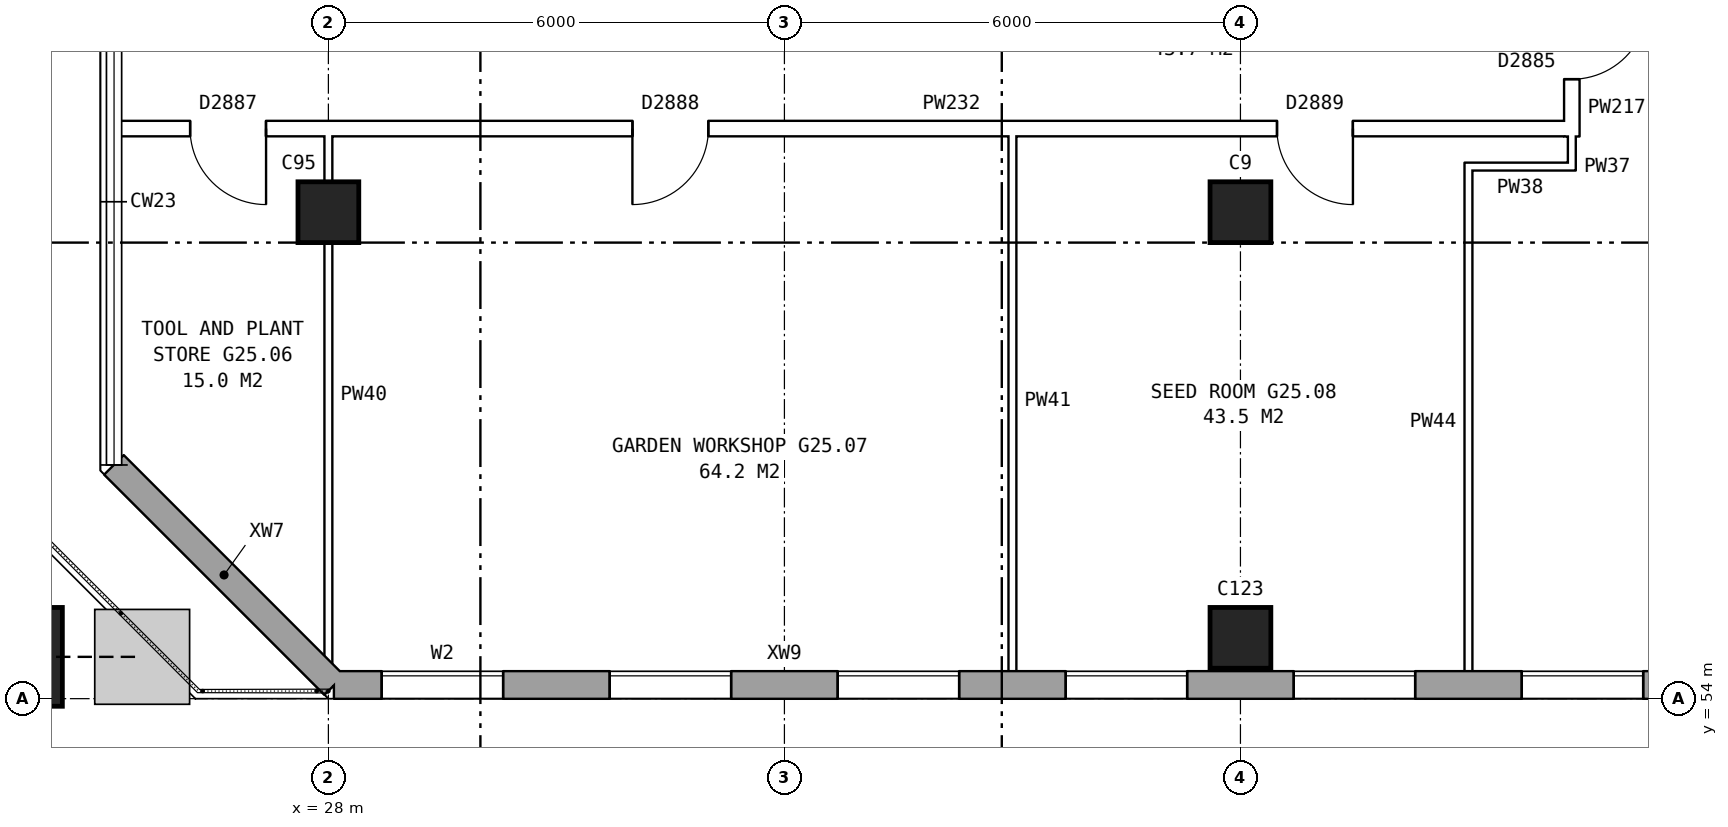
"""IFC4 building model, lengths in metres.
Left out: names, types, materials, properties, quantities, classifications, styles, units other than length and angle.
Written with IfcOpenShell. Run it as: python <this file> out.ifc"""

import sys

from ifc_helpers import new_model, si_unit, direction, frame, frame_2d, origin, origin_2d, place, context, subcontext, project, spatial, rectangle, hollow_rectangle, extrude, element, fill, save


model = new_model("IFC4")
c1 = context("Model", 3, precision=1e-05, world=origin(), true_north=direction((0.0, 1.0)))
c2 = subcontext(c1, "Body", "Model", "MODEL_VIEW")
j1 = project(units=[si_unit("LENGTHUNIT", "METRE"), si_unit("PLANEANGLEUNIT", "RADIAN")], contexts=[c1])
p1 = place(None, origin())
s1 = spatial("IfcSite", under=j1, at=p1, CompositionType="ELEMENT")
p2 = place(p1, origin())
s2 = spatial("IfcBuilding", under=s1, at=p2, CompositionType="ELEMENT")
p3 = place(p2, frame((0.0, 0.0, 90.2)))
s3 = spatial("IfcBuildingStorey", under=s2, at=p3, CompositionType="ELEMENT", Elevation=90.2)
for number, where, z_axis, x_axis in (
    (1, (28.0, 60.4, 0.0), (0.0, 0.0, 1.0), (1.0, 0.0, 0.0)),
    (2, (40.0, 54.8, 0.0), (0.0, 0.0, 1.0), (1.0, 0.0, 0.0)),
    (3, (40.0, 60.4, 0.0), (0.0, 0.0, 1.0), (1.0, 0.0, 0.0)),
):
    element("IfcColumn", number, at=place(p3, frame(where, z_axis=z_axis, x_axis=x_axis)), inside=s3, PredefinedType="COLUMN", context=c2, shape_type="SweptSolid", body=[
        extrude(rectangle(XDim=0.8, YDim=0.8, at=origin_2d()), origin(), (0.0, 0.0, 1.0), 5.6),
    ])
p4 = place(p3, frame((23.85, 54.55, 0.177), z_axis=(0.271662512341, 0.0, 0.962392580701), x_axis=(0.0, 1.0, 0.0)))
e4 = element("IfcColumn", 4, at=p4, inside=s3, PredefinedType="COLUMN", context=c2, shape_type="SweptSolid", body=[
    extrude(hollow_rectangle(XDim=1.3, YDim=1.3, WallThickness=0.07, at=origin_2d()), origin(), (0.0, 0.0, 1.0), 6.075),
])
p5 = place(p3, frame((25.18, 57.075, 0.0), z_axis=(0.0, 0.0, 1.0), x_axis=(0.707106781187, -0.707106781187, 0.0)))
e5 = element("IfcWall", 5, at=p5, inside=s3, PredefinedType="STANDARD", context=c2, shape_type="SweptSolid", body=[
    extrude(rectangle(XDim=4.094, YDim=0.36, at=frame_2d((2.047, 0.0))), origin(), (0.0, 0.0, 1.0), 5.6),
])
p6 = place(p3, frame((28.075, 54.18, 0.0), z_axis=(0.0, 0.0, 1.0), x_axis=(1.0, 0.0, 0.0)))
e6 = element("IfcWall", 6, at=p6, inside=s3, PredefinedType="STANDARD", context=c2, shape_type="SweptSolid", body=[
    extrude(rectangle(XDim=44.851, YDim=0.36, at=frame_2d((22.425, 0.0))), origin(), (0.0, 0.0, 1.0), 5.6),
])
p7 = place(p6, frame((0.625, 0.0, 0.15)))
e7 = element("IfcOpeningElement", 7, at=p7, cuts=e6, PredefinedType="OPENING", context=c2, shape_type="SweptSolid", body=[
    extrude(rectangle(XDim=1.6, YDim=2.4, at=frame_2d((0.8, 1.2))), frame((0.0, 0.19, 0.0), z_axis=(0.0, -1.0, 0.0), x_axis=(1.0, 0.0, 0.0)), (0.0, 0.0, 1.0), 0.38),
])
p8 = place(p6, frame((3.625, 0.0, 0.15)))
e8 = element("IfcOpeningElement", 8, at=p8, cuts=e6, PredefinedType="OPENING", context=c2, shape_type="SweptSolid", body=[
    extrude(rectangle(XDim=1.6, YDim=2.4, at=frame_2d((0.8, 1.2))), frame((0.0, 0.19, 0.0), z_axis=(0.0, -1.0, 0.0), x_axis=(1.0, 0.0, 0.0)), (0.0, 0.0, 1.0), 0.38),
])
p9 = place(p6, frame((6.625, 0.0, 0.15)))
e9 = element("IfcOpeningElement", 9, at=p9, cuts=e6, PredefinedType="OPENING", context=c2, shape_type="SweptSolid", body=[
    extrude(rectangle(XDim=1.6, YDim=2.4, at=frame_2d((0.8, 1.2))), frame((0.0, 0.19, 0.0), z_axis=(0.0, -1.0, 0.0), x_axis=(1.0, 0.0, 0.0)), (0.0, 0.0, 1.0), 0.38),
])
p10 = place(p6, frame((9.625, 0.0, 0.15)))
e10 = element("IfcOpeningElement", 10, at=p10, cuts=e6, PredefinedType="OPENING", context=c2, shape_type="SweptSolid", body=[
    extrude(rectangle(XDim=1.6, YDim=2.4, at=frame_2d((0.8, 1.2))), frame((0.0, 0.19, 0.0), z_axis=(0.0, -1.0, 0.0), x_axis=(1.0, 0.0, 0.0)), (0.0, 0.0, 1.0), 0.38),
])
p11 = place(p6, frame((12.625, 0.0, 0.15)))
e11 = element("IfcOpeningElement", 11, at=p11, cuts=e6, PredefinedType="OPENING", context=c2, shape_type="SweptSolid", body=[
    extrude(rectangle(XDim=1.6, YDim=2.4, at=frame_2d((0.8, 1.2))), frame((0.0, 0.19, 0.0), z_axis=(0.0, -1.0, 0.0), x_axis=(1.0, 0.0, 0.0)), (0.0, 0.0, 1.0), 0.38),
])
p12 = place(p6, frame((15.625, 0.0, 0.15)))
e12 = element("IfcOpeningElement", 12, at=p12, cuts=e6, PredefinedType="OPENING", context=c2, shape_type="SweptSolid", body=[
    extrude(rectangle(XDim=1.6, YDim=2.4, at=frame_2d((0.8, 1.2))), frame((0.0, 0.19, 0.0), z_axis=(0.0, -1.0, 0.0), x_axis=(1.0, 0.0, 0.0)), (0.0, 0.0, 1.0), 0.38),
])
p13 = place(p6, frame((18.625, 0.0, 0.15)))
e13 = element("IfcOpeningElement", 13, at=p13, cuts=e6, PredefinedType="OPENING", context=c2, shape_type="SweptSolid", body=[
    extrude(rectangle(XDim=1.6, YDim=2.4, at=frame_2d((0.8, 1.2))), frame((0.0, 0.19, 0.0), z_axis=(0.0, -1.0, 0.0), x_axis=(1.0, 0.0, 0.0)), (0.0, 0.0, 1.0), 0.38),
])
p14 = place(p6, frame((21.625, 0.0, 0.15)))
e14 = element("IfcOpeningElement", 14, at=p14, cuts=e6, PredefinedType="OPENING", context=c2, shape_type="SweptSolid", body=[
    extrude(rectangle(XDim=1.6, YDim=2.4, at=frame_2d((0.8, 1.2))), frame((0.0, 0.19, 0.0), z_axis=(0.0, -1.0, 0.0), x_axis=(1.0, 0.0, 0.0)), (0.0, 0.0, 1.0), 0.38),
])
p15 = place(p6, frame((24.625, 0.0, 0.15)))
e15 = element("IfcOpeningElement", 15, at=p15, cuts=e6, PredefinedType="OPENING", context=c2, shape_type="SweptSolid", body=[
    extrude(rectangle(XDim=1.6, YDim=2.4, at=frame_2d((0.8, 1.2))), frame((0.0, 0.19, 0.0), z_axis=(0.0, -1.0, 0.0), x_axis=(1.0, 0.0, 0.0)), (0.0, 0.0, 1.0), 0.38),
])
p16 = place(p6, frame((27.625, 0.0, 0.15)))
e16 = element("IfcOpeningElement", 16, at=p16, cuts=e6, PredefinedType="OPENING", context=c2, shape_type="SweptSolid", body=[
    extrude(rectangle(XDim=1.6, YDim=2.4, at=frame_2d((0.8, 1.2))), frame((0.0, 0.19, 0.0), z_axis=(0.0, -1.0, 0.0), x_axis=(1.0, 0.0, 0.0)), (0.0, 0.0, 1.0), 0.38),
])
p17 = place(p6, frame((30.625, 0.0, 0.15)))
e17 = element("IfcOpeningElement", 17, at=p17, cuts=e6, PredefinedType="OPENING", context=c2, shape_type="SweptSolid", body=[
    extrude(rectangle(XDim=1.6, YDim=2.4, at=frame_2d((0.8, 1.2))), frame((0.0, 0.19, 0.0), z_axis=(0.0, -1.0, 0.0), x_axis=(1.0, 0.0, 0.0)), (0.0, 0.0, 1.0), 0.38),
])
p18 = place(p6, frame((33.625, 0.0, 0.15)))
e18 = element("IfcOpeningElement", 18, at=p18, cuts=e6, PredefinedType="OPENING", context=c2, shape_type="SweptSolid", body=[
    extrude(rectangle(XDim=1.6, YDim=2.4, at=frame_2d((0.8, 1.2))), frame((0.0, 0.19, 0.0), z_axis=(0.0, -1.0, 0.0), x_axis=(1.0, 0.0, 0.0)), (0.0, 0.0, 1.0), 0.38),
])
p19 = place(p6, frame((36.625, 0.0, 0.15)))
e19 = element("IfcOpeningElement", 19, at=p19, cuts=e6, PredefinedType="OPENING", context=c2, shape_type="SweptSolid", body=[
    extrude(rectangle(XDim=1.6, YDim=2.4, at=frame_2d((0.8, 1.2))), frame((0.0, 0.19, 0.0), z_axis=(0.0, -1.0, 0.0), x_axis=(1.0, 0.0, 0.0)), (0.0, 0.0, 1.0), 0.38),
])
p20 = place(p6, frame((39.625, 0.0, 0.15)))
e20 = element("IfcOpeningElement", 20, at=p20, cuts=e6, PredefinedType="OPENING", context=c2, shape_type="SweptSolid", body=[
    extrude(rectangle(XDim=1.6, YDim=2.4, at=frame_2d((0.8, 1.2))), frame((0.0, 0.19, 0.0), z_axis=(0.0, -1.0, 0.0), x_axis=(1.0, 0.0, 0.0)), (0.0, 0.0, 1.0), 0.38),
])
p21 = place(p6, frame((42.625, 0.0, 0.15)))
e21 = element("IfcOpeningElement", 21, at=p21, cuts=e6, PredefinedType="OPENING", context=c2, shape_type="SweptSolid", body=[
    extrude(rectangle(XDim=1.6, YDim=2.4, at=frame_2d((0.8, 1.2))), frame((0.0, 0.19, 0.0), z_axis=(0.0, -1.0, 0.0), x_axis=(1.0, 0.0, 0.0)), (0.0, 0.0, 1.0), 0.38),
])
p22 = place(p3, frame((42.95, 61.0, 0.0), z_axis=(0.0, 0.0, 1.0), x_axis=(1.0, 0.0, 0.0)))
e22 = element("IfcWall", 22, at=p22, inside=s3, PredefinedType="PARTITIONING", context=c2, shape_type="SweptSolid", body=[
    extrude(rectangle(XDim=1.46, YDim=0.1, at=frame_2d((0.73, 0.0))), origin(), (0.0, 0.0, 1.0), 5.6),
])
p23 = place(p3, frame((25.24, 61.5, 0.0), z_axis=(0.0, 0.0, 1.0), x_axis=(1.0, 0.0, 0.0)))
e23 = element("IfcWall", 23, at=p23, inside=s3, PredefinedType="PARTITIONING", context=c2, shape_type="SweptSolid", body=[
    extrude(rectangle(XDim=19.22, YDim=0.2, at=frame_2d((9.61, 0.0))), origin(), (0.0, 0.0, 1.0), 5.6),
])
p24 = place(p23, frame((0.94, 0.0, 0.0)))
e24 = element("IfcOpeningElement", 24, at=p24, cuts=e23, PredefinedType="OPENING", context=c2, shape_type="SweptSolid", body=[
    extrude(rectangle(XDim=1.0, YDim=2.1, at=frame_2d((0.5, 1.05))), frame((0.0, 0.11, 0.0), z_axis=(0.0, -1.0, 0.0), x_axis=(1.0, 0.0, 0.0)), (0.0, 0.0, 1.0), 0.22),
])
p25 = place(p23, frame((6.76, 0.0, 0.0)))
e25 = element("IfcOpeningElement", 25, at=p25, cuts=e23, PredefinedType="OPENING", context=c2, shape_type="SweptSolid", body=[
    extrude(rectangle(XDim=1.0, YDim=2.1, at=frame_2d((0.5, 1.05))), frame((0.0, 0.11, 0.0), z_axis=(0.0, -1.0, 0.0), x_axis=(1.0, 0.0, 0.0)), (0.0, 0.0, 1.0), 0.22),
])
p26 = place(p23, frame((15.24, 0.0, 0.0)))
e26 = element("IfcOpeningElement", 26, at=p26, cuts=e23, PredefinedType="OPENING", context=c2, shape_type="SweptSolid", body=[
    extrude(rectangle(XDim=1.0, YDim=2.1, at=frame_2d((0.5, 1.05))), frame((0.0, 0.11, 0.0), z_axis=(0.0, -1.0, 0.0), x_axis=(1.0, 0.0, 0.0)), (0.0, 0.0, 1.0), 0.22),
])
p27 = place(p3, frame((28.0, 54.389, 0.0), z_axis=(0.0, 0.0, 1.0), x_axis=(0.0, 1.0, 0.0)))
e27 = element("IfcWall", 27, at=p27, inside=s3, PredefinedType="PARTITIONING", context=c2, shape_type="SweptSolid", body=[
    extrude(rectangle(XDim=7.211, YDim=0.1, at=frame_2d((3.605, 0.0))), origin(), (0.0, 0.0, 1.0), 5.6),
])
p28 = place(p3, frame((37.0, 54.24, 0.0), z_axis=(0.0, 0.0, 1.0), x_axis=(0.0, 1.0, 0.0)))
e28 = element("IfcWall", 28, at=p28, inside=s3, PredefinedType="PARTITIONING", context=c2, shape_type="SweptSolid", body=[
    extrude(rectangle(XDim=7.36, YDim=0.1, at=frame_2d((3.68, 0.0))), origin(), (0.0, 0.0, 1.0), 5.6),
])
p29 = place(p3, frame((43.0, 54.24, 0.0), z_axis=(0.0, 0.0, 1.0), x_axis=(0.0, 1.0, 0.0)))
e29 = element("IfcWall", 29, at=p29, inside=s3, PredefinedType="PARTITIONING", context=c2, shape_type="SweptSolid", body=[
    extrude(rectangle(XDim=6.81, YDim=0.1, at=frame_2d((3.405, 0.0))), origin(), (0.0, 0.0, 1.0), 5.6),
])
p30 = place(p3, frame((44.36, 61.398, 0.0), z_axis=(0.0, 0.0, 1.0), x_axis=(0.0, 1.0, 0.0)))
e30 = element("IfcWall", 30, at=p30, inside=s3, PredefinedType="PARTITIONING", context=c2, shape_type="SweptSolid", body=[
    extrude(rectangle(XDim=2.502, YDim=0.2, at=frame_2d((1.251, 0.0))), origin(), (0.0, 0.0, 1.0), 5.6),
])
p31 = place(p30, frame((0.751, 0.0, 0.0)))
e31 = element("IfcOpeningElement", 31, at=p31, cuts=e30, PredefinedType="OPENING", context=c2, shape_type="SweptSolid", body=[
    extrude(rectangle(XDim=1.0, YDim=2.1, at=frame_2d((0.5, 1.05))), frame((0.0, 0.11, 0.0), z_axis=(0.0, -1.0, 0.0), x_axis=(1.0, 0.0, 0.0)), (0.0, 0.0, 1.0), 0.22),
])
p32 = place(p3, frame((44.36, 60.95, 0.0), z_axis=(0.0, 0.0, 1.0), x_axis=(0.0, 1.0, 0.0)))
e32 = element("IfcWall", 32, at=p32, inside=s3, PredefinedType="PARTITIONING", context=c2, shape_type="SweptSolid", body=[
    extrude(rectangle(XDim=0.652, YDim=0.1, at=frame_2d((0.326, 0.0))), origin(), (0.0, 0.0, 1.0), 5.6),
])
p33 = place(p7, origin())
e33 = element("IfcWindow", 33, at=p33, inside=s3, PartitioningType="SINGLE_PANEL", PredefinedType="WINDOW", context=c2, shape_type="SweptSolid", body=[
    extrude(rectangle(XDim=1.6, YDim=2.4, at=frame_2d((0.8, 1.2))), frame((0.0, 0.15, 0.0), z_axis=(0.0, -1.0, 0.0), x_axis=(1.0, 0.0, 0.0)), (0.0, 0.0, 1.0), 0.06),
])
fill(e7, e33)
p34 = place(p8, origin())
e34 = element("IfcWindow", 34, at=p34, inside=s3, PartitioningType="SINGLE_PANEL", PredefinedType="WINDOW", context=c2, shape_type="SweptSolid", body=[
    extrude(rectangle(XDim=1.6, YDim=2.4, at=frame_2d((0.8, 1.2))), frame((0.0, 0.15, 0.0), z_axis=(0.0, -1.0, 0.0), x_axis=(1.0, 0.0, 0.0)), (0.0, 0.0, 1.0), 0.06),
])
fill(e8, e34)
p35 = place(p9, origin())
e35 = element("IfcWindow", 35, at=p35, inside=s3, PartitioningType="SINGLE_PANEL", PredefinedType="WINDOW", context=c2, shape_type="SweptSolid", body=[
    extrude(rectangle(XDim=1.6, YDim=2.4, at=frame_2d((0.8, 1.2))), frame((0.0, 0.15, 0.0), z_axis=(0.0, -1.0, 0.0), x_axis=(1.0, 0.0, 0.0)), (0.0, 0.0, 1.0), 0.06),
])
fill(e9, e35)
p36 = place(p10, origin())
e36 = element("IfcWindow", 36, at=p36, inside=s3, PartitioningType="SINGLE_PANEL", PredefinedType="WINDOW", context=c2, shape_type="SweptSolid", body=[
    extrude(rectangle(XDim=1.6, YDim=2.4, at=frame_2d((0.8, 1.2))), frame((0.0, 0.15, 0.0), z_axis=(0.0, -1.0, 0.0), x_axis=(1.0, 0.0, 0.0)), (0.0, 0.0, 1.0), 0.06),
])
fill(e10, e36)
p37 = place(p11, origin())
e37 = element("IfcWindow", 37, at=p37, inside=s3, PartitioningType="SINGLE_PANEL", PredefinedType="WINDOW", context=c2, shape_type="SweptSolid", body=[
    extrude(rectangle(XDim=1.6, YDim=2.4, at=frame_2d((0.8, 1.2))), frame((0.0, 0.15, 0.0), z_axis=(0.0, -1.0, 0.0), x_axis=(1.0, 0.0, 0.0)), (0.0, 0.0, 1.0), 0.06),
])
fill(e11, e37)
p38 = place(p12, origin())
e38 = element("IfcWindow", 38, at=p38, inside=s3, PartitioningType="SINGLE_PANEL", PredefinedType="WINDOW", context=c2, shape_type="SweptSolid", body=[
    extrude(rectangle(XDim=1.6, YDim=2.4, at=frame_2d((0.8, 1.2))), frame((0.0, 0.15, 0.0), z_axis=(0.0, -1.0, 0.0), x_axis=(1.0, 0.0, 0.0)), (0.0, 0.0, 1.0), 0.06),
])
fill(e12, e38)
p39 = place(p24, frame((1.0, 0.0, 0.0), z_axis=(0.0, 0.0, 1.0), x_axis=(-1.0, 0.0, 0.0)))
e39 = element("IfcDoor", 39, at=p39, inside=s3, OperationType="SINGLE_SWING_LEFT", PredefinedType="DOOR", context=c2, shape_type="SweptSolid", body=[
    extrude(rectangle(XDim=1.0, YDim=2.1, at=frame_2d((0.5, 1.05))), frame((0.0, 0.025, 0.0), z_axis=(0.0, -1.0, 0.0), x_axis=(1.0, 0.0, 0.0)), (0.0, 0.0, 1.0), 0.05),
])
fill(e24, e39)
p40 = place(p25, frame((1.0, 0.0, 0.0), z_axis=(0.0, 0.0, 1.0), x_axis=(-1.0, 0.0, 0.0)))
e40 = element("IfcDoor", 40, at=p40, inside=s3, OperationType="SINGLE_SWING_RIGHT", PredefinedType="DOOR", context=c2, shape_type="SweptSolid", body=[
    extrude(rectangle(XDim=1.0, YDim=2.1, at=frame_2d((0.5, 1.05))), frame((0.0, 0.025, 0.0), z_axis=(0.0, -1.0, 0.0), x_axis=(1.0, 0.0, 0.0)), (0.0, 0.0, 1.0), 0.05),
])
fill(e25, e40)
p41 = place(p26, frame((1.0, 0.0, 0.0), z_axis=(0.0, 0.0, 1.0), x_axis=(-1.0, 0.0, 0.0)))
e41 = element("IfcDoor", 41, at=p41, inside=s3, OperationType="SINGLE_SWING_LEFT", PredefinedType="DOOR", context=c2, shape_type="SweptSolid", body=[
    extrude(rectangle(XDim=1.0, YDim=2.1, at=frame_2d((0.5, 1.05))), frame((0.0, 0.025, 0.0), z_axis=(0.0, -1.0, 0.0), x_axis=(1.0, 0.0, 0.0)), (0.0, 0.0, 1.0), 0.05),
])
fill(e26, e41)
p42 = place(p31, frame((1.0, 0.0, 0.0), z_axis=(0.0, 0.0, 1.0), x_axis=(-1.0, 0.0, 0.0)))
e42 = element("IfcDoor", 42, at=p42, inside=s3, OperationType="SINGLE_SWING_LEFT", PredefinedType="DOOR", context=c2, shape_type="SweptSolid", body=[
    extrude(rectangle(XDim=1.0, YDim=2.1, at=frame_2d((0.5, 1.05))), frame((0.0, 0.025, 0.0), z_axis=(0.0, -1.0, 0.0), x_axis=(1.0, 0.0, 0.0)), (0.0, 0.0, 1.0), 0.05),
])
fill(e31, e42)
save(model, sys.argv[1])
